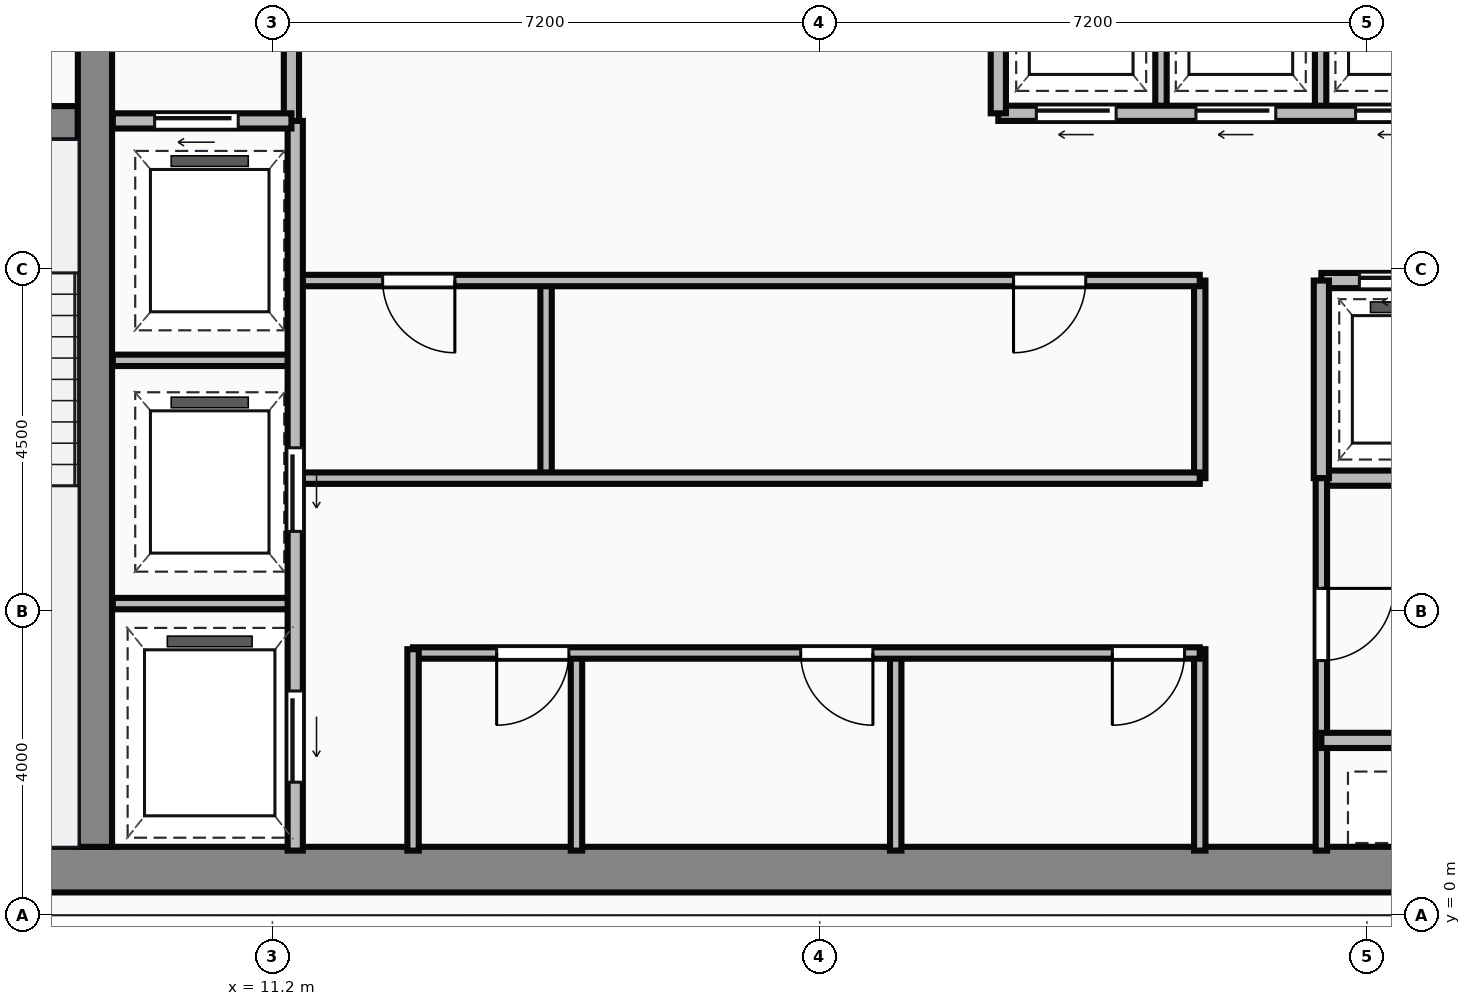
"""IFC4 building model, lengths in metres.
Left out: names, types, materials, properties, quantities, classifications, styles, units other than length and angle.
Written with IfcOpenShell. Run it as: python <this file> out.ifc"""

import sys

from ifc_helpers import new_model, si_unit, direction, frame, frame_2d, origin, place, context, subcontext, project, spatial, rectangle, extrude, source, transform, mapped, element, fill, save


model = new_model("IFC4")
c1 = context("Model", 3, precision=1e-05, world=origin(), true_north=direction((0.0, 1.0)))
c2 = subcontext(c1, "Body", "Model", "MODEL_VIEW")
j1 = project(units=[si_unit("LENGTHUNIT", "METRE"), si_unit("PLANEANGLEUNIT", "RADIAN")], contexts=[c1])
p1 = place(None, origin())
s1 = spatial("IfcSite", under=j1, at=p1, CompositionType="ELEMENT")
p2 = place(p1, origin())
s2 = spatial("IfcBuilding", under=s1, at=p2, CompositionType="ELEMENT")
p3 = place(p2, frame((0.0, 0.0, 221.45)))
s3 = spatial("IfcBuildingStorey", under=s2, at=p3, CompositionType="ELEMENT", Elevation=221.45)
m1 = source(origin(), c2, "Body", "SweptSolid", [
    extrude(rectangle(XDim=29.5, YDim=0.6, at=frame_2d((14.75, 0.0))), origin(), (0.0, 0.0, 1.0), 3.65),
])
p4 = place(p3, frame((4.5, 0.6, 0.0), z_axis=(0.0, 0.0, 1.0), x_axis=(1.0, 0.0, 0.0)))
e1 = element("IfcWall", 1, at=p4, inside=s3, PredefinedType="SHEAR", context=c2, shape_type="MappedRepresentation", body=[
    mapped(m1, transform((0.0, 0.0, 0.0))),
])
m2 = source(origin(), c2, "Body", "SweptSolid", [
    extrude(rectangle(XDim=12.5, YDim=0.45, at=frame_2d((6.25, 0.0))), origin(), (0.0, 0.0, 1.0), 3.65),
])
p5 = place(p3, frame((8.865, 0.9, 0.0), z_axis=(0.0, 0.0, 1.0), x_axis=(0.0, 1.0, 0.0)))
e2 = element("IfcWall", 2, at=p5, inside=s3, PredefinedType="SHEAR", context=c2, shape_type="MappedRepresentation", body=[
    mapped(m2, transform((0.0, 0.0, 0.0))),
])
m3 = source(origin(), c2, "Body", "SweptSolid", [
    extrude(rectangle(XDim=3.39, YDim=0.45, at=frame_2d((1.695, 0.0))), origin(), (0.0, 0.0, 1.0), 3.65),
])
p6 = place(p3, frame((5.25, 10.42, 0.0), z_axis=(0.0, 0.0, 1.0), x_axis=(1.0, 0.0, 0.0)))
e3 = element("IfcWall", 3, at=p6, inside=s3, PredefinedType="SHEAR", context=c2, shape_type="MappedRepresentation", body=[
    mapped(m3, transform((0.0, 0.0, 0.0))),
])
p7 = place(p6, frame((1.05, 0.0, 0.0)))
e4 = element("IfcOpeningElement", 4, at=p7, cuts=e3, PredefinedType="OPENING", context=c2, shape_type="SweptSolid", body=[
    extrude(rectangle(XDim=1.1, YDim=2.15, at=frame_2d((0.55, 1.075))), frame((0.0, 0.235, 0.0), z_axis=(0.0, -1.0, 0.0), x_axis=(1.0, 0.0, 0.0)), (0.0, 0.0, 1.0), 0.47),
])
m4 = source(origin(), c2, "Body", "SweptSolid", [
    extrude(rectangle(XDim=3.18, YDim=0.2, at=frame_2d((1.59, 0.0))), origin(), (0.0, 0.0, 1.0), 3.4),
])
p8 = place(p3, frame((11.45, 10.42, 0.0), z_axis=(0.0, 0.0, 1.0), x_axis=(0.0, 1.0, 0.0)))
e5 = element("IfcWall", 5, at=p8, inside=s3, PredefinedType="PARTITIONING", context=c2, shape_type="MappedRepresentation", body=[
    mapped(m4, transform((0.0, 0.0, 0.0))),
])
m5 = source(origin(), c2, "Body", "SweptSolid", [
    extrude(rectangle(XDim=2.35, YDim=0.2, at=frame_2d((1.175, 0.0))), origin(), (0.0, 0.0, 1.0), 3.4),
])
p9 = place(p3, frame((9.1, 10.45, 0.0), z_axis=(0.0, 0.0, 1.0), x_axis=(1.0, 0.0, 0.0)))
e6 = element("IfcWall", 6, at=p9, inside=s3, PredefinedType="PARTITIONING", context=c2, shape_type="MappedRepresentation", body=[
    mapped(m5, transform((0.0, 0.0, 0.0))),
])
p10 = place(p9, frame((0.55, 0.0, 0.0)))
e7 = element("IfcOpeningElement", 7, at=p10, cuts=e6, PredefinedType="OPENING", context=c2, shape_type="SweptSolid", body=[
    extrude(rectangle(XDim=1.1, YDim=2.15, at=frame_2d((0.55, 1.075))), frame((0.0, 0.11, 0.0), z_axis=(0.0, -1.0, 0.0), x_axis=(1.0, 0.0, 0.0)), (0.0, 0.0, 1.0), 0.22),
])
m6 = source(origin(), c2, "Body", "SweptSolid", [
    extrude(rectangle(XDim=9.6, YDim=0.2, at=frame_2d((4.8, 0.0))), origin(), (0.0, 0.0, 1.0), 3.4),
])
p11 = place(p3, frame((11.5, 0.85, 0.0), z_axis=(0.0, 0.0, 1.0), x_axis=(0.0, 1.0, 0.0)))
e8 = element("IfcWall", 8, at=p11, inside=s3, PredefinedType="PARTITIONING", context=c2, shape_type="MappedRepresentation", body=[
    mapped(m6, transform((0.0, 0.0, 0.0))),
])
p12 = place(p11, frame((4.2, 0.0, 0.0)))
e9 = element("IfcOpeningElement", 9, at=p12, cuts=e8, PredefinedType="OPENING", context=c2, shape_type="SweptSolid", body=[
    extrude(rectangle(XDim=1.1, YDim=2.15, at=frame_2d((0.55, 1.075))), frame((0.0, 0.11, 0.0), z_axis=(0.0, -1.0, 0.0), x_axis=(1.0, 0.0, 0.0)), (0.0, 0.0, 1.0), 0.22),
])
p13 = place(p11, frame((0.9, 0.0, 0.0)))
e10 = element("IfcOpeningElement", 10, at=p13, cuts=e8, PredefinedType="OPENING", context=c2, shape_type="SweptSolid", body=[
    extrude(rectangle(XDim=1.2, YDim=2.15, at=frame_2d((0.6, 1.075))), frame((0.0, 0.11, 0.0), z_axis=(0.0, -1.0, 0.0), x_axis=(1.0, 0.0, 0.0)), (0.0, 0.0, 1.0), 0.22),
])
m7 = source(origin(), c2, "Body", "SweptSolid", [
    extrude(rectangle(XDim=2.4, YDim=0.15, at=frame_2d((1.2, 0.0))), origin(), (0.0, 0.0, 1.0), 3.4),
])
for number, where, z_axis, x_axis in (
    (11, (9.1, 4.1, 0.0), (0.0, 0.0, 1.0), (1.0, 0.0, 0.0)),
    (12, (9.1, 7.3, 0.0), (0.0, 0.0, 1.0), (1.0, 0.0, 0.0)),
):
    element("IfcWall", number, at=place(p3, frame(where, z_axis=z_axis, x_axis=x_axis)), inside=s3, PredefinedType="PARTITIONING", context=c2, shape_type="MappedRepresentation", body=[
        mapped(m7, transform((0.0, 0.0, 0.0))),
    ])
m8 = source(origin(), c2, "Body", "SweptSolid", [
    extrude(rectangle(XDim=2.65, YDim=0.15, at=frame_2d((1.325, 0.0))), origin(), (0.0, 0.0, 1.0), 3.4),
])
p14 = place(p3, frame((13.05, 0.85, 0.0), z_axis=(0.0, 0.0, 1.0), x_axis=(0.0, 1.0, 0.0)))
e13 = element("IfcWall", 13, at=p14, inside=s3, PredefinedType="PARTITIONING", context=c2, shape_type="MappedRepresentation", body=[
    mapped(m8, transform((0.0, 0.0, 0.0))),
])
m9 = source(origin(), c2, "Body", "SweptSolid", [
    extrude(rectangle(XDim=10.35, YDim=0.15, at=frame_2d((5.175, 0.0))), origin(), (0.0, 0.0, 1.0), 3.4),
])
p15 = place(p3, frame((13.05, 3.45, 0.0), z_axis=(0.0, 0.0, 1.0), x_axis=(1.0, 0.0, 0.0)))
e14 = element("IfcWall", 14, at=p15, inside=s3, PredefinedType="PARTITIONING", context=c2, shape_type="MappedRepresentation", body=[
    mapped(m9, transform((0.0, 0.0, 0.0))),
])
p16 = place(p15, frame((1.1, 0.0, 0.0)))
e15 = element("IfcOpeningElement", 15, at=p16, cuts=e14, PredefinedType="OPENING", context=c2, shape_type="SweptSolid", body=[
    extrude(rectangle(XDim=0.95, YDim=2.15, at=frame_2d((0.475, 1.075))), frame((0.0, 0.085, 0.0), z_axis=(0.0, -1.0, 0.0), x_axis=(1.0, 0.0, 0.0)), (0.0, 0.0, 1.0), 0.17),
])
p17 = place(p15, frame((5.1, 0.0, 0.0)))
e16 = element("IfcOpeningElement", 16, at=p17, cuts=e14, PredefinedType="OPENING", context=c2, shape_type="SweptSolid", body=[
    extrude(rectangle(XDim=0.95, YDim=2.15, at=frame_2d((0.475, 1.075))), frame((0.0, 0.085, 0.0), z_axis=(0.0, -1.0, 0.0), x_axis=(1.0, 0.0, 0.0)), (0.0, 0.0, 1.0), 0.17),
])
p18 = place(p15, frame((9.2, 0.0, 0.0)))
e17 = element("IfcOpeningElement", 17, at=p18, cuts=e14, PredefinedType="OPENING", context=c2, shape_type="SweptSolid", body=[
    extrude(rectangle(XDim=0.95, YDim=2.15, at=frame_2d((0.475, 1.075))), frame((0.0, 0.085, 0.0), z_axis=(0.0, -1.0, 0.0), x_axis=(1.0, 0.0, 0.0)), (0.0, 0.0, 1.0), 0.17),
])
p19 = place(p3, frame((23.4, 0.85, 0.0), z_axis=(0.0, 0.0, 1.0), x_axis=(0.0, 1.0, 0.0)))
e18 = element("IfcWall", 18, at=p19, inside=s3, PredefinedType="PARTITIONING", context=c2, shape_type="MappedRepresentation", body=[
    mapped(m8, transform((0.0, 0.0, 0.0))),
])
m10 = source(origin(), c2, "Body", "SweptSolid", [
    extrude(rectangle(XDim=2.6, YDim=0.15, at=frame_2d((1.3, 0.0))), origin(), (0.0, 0.0, 1.0), 3.4),
])
for number, where, z_axis, x_axis in (
    (19, (15.2, 0.85, 0.0), (0.0, 0.0, 1.0), (0.0, 1.0, 0.0)),
    (20, (19.4, 0.85, 0.0), (0.0, 0.0, 1.0), (0.0, 1.0, 0.0)),
):
    element("IfcWall", number, at=place(p3, frame(where, z_axis=z_axis, x_axis=x_axis)), inside=s3, PredefinedType="PARTITIONING", context=c2, shape_type="MappedRepresentation", body=[
        mapped(m10, transform((0.0, 0.0, 0.0))),
    ])
m11 = source(origin(), c2, "Body", "SweptSolid", [
    extrude(rectangle(XDim=11.85, YDim=0.15, at=frame_2d((5.925, 0.0))), origin(), (0.0, 0.0, 1.0), 3.4),
])
p20 = place(p3, frame((11.55, 5.75, 0.0), z_axis=(0.0, 0.0, 1.0), x_axis=(1.0, 0.0, 0.0)))
e21 = element("IfcWall", 21, at=p20, inside=s3, PredefinedType="PARTITIONING", context=c2, shape_type="MappedRepresentation", body=[
    mapped(m11, transform((0.0, 0.0, 0.0))),
])
p21 = place(p3, frame((11.55, 8.35, 0.0), z_axis=(0.0, 0.0, 1.0), x_axis=(1.0, 0.0, 0.0)))
e22 = element("IfcWall", 22, at=p21, inside=s3, PredefinedType="PARTITIONING", context=c2, shape_type="MappedRepresentation", body=[
    mapped(m11, transform((0.0, 0.0, 0.0))),
])
p22 = place(p21, frame((1.1, 0.0, 0.0)))
e23 = element("IfcOpeningElement", 23, at=p22, cuts=e22, PredefinedType="OPENING", context=c2, shape_type="SweptSolid", body=[
    extrude(rectangle(XDim=0.95, YDim=2.15, at=frame_2d((0.475, 1.075))), frame((0.0, 0.085, 0.0), z_axis=(0.0, -1.0, 0.0), x_axis=(1.0, 0.0, 0.0)), (0.0, 0.0, 1.0), 0.17),
])
p23 = place(p21, frame((9.4, 0.0, 0.0)))
e24 = element("IfcOpeningElement", 24, at=p23, cuts=e22, PredefinedType="OPENING", context=c2, shape_type="SweptSolid", body=[
    extrude(rectangle(XDim=0.95, YDim=2.15, at=frame_2d((0.475, 1.075))), frame((0.0, 0.085, 0.0), z_axis=(0.0, -1.0, 0.0), x_axis=(1.0, 0.0, 0.0)), (0.0, 0.0, 1.0), 0.17),
])
m12 = source(origin(), c2, "Body", "SweptSolid", [
    extrude(rectangle(XDim=2.6, YDim=0.15, at=frame_2d((1.3, 0.0))), origin(), (0.0, 0.0, 1.0), 3.4),
])
p24 = place(p3, frame((23.4, 5.75, 0.0), z_axis=(0.0, 0.0, 1.0), x_axis=(0.0, 1.0, 0.0)))
e25 = element("IfcWall", 25, at=p24, inside=s3, PredefinedType="PARTITIONING", context=c2, shape_type="MappedRepresentation", body=[
    mapped(m12, transform((0.0, 0.0, 0.0))),
])
m13 = source(origin(), c2, "Body", "SweptSolid", [
    extrude(rectangle(XDim=2.5, YDim=0.15, at=frame_2d((1.25, 0.0))), origin(), (0.0, 0.0, 1.0), 3.4),
])
p25 = place(p3, frame((14.8, 5.8, 0.0), z_axis=(0.0, 0.0, 1.0), x_axis=(0.0, 1.0, 0.0)))
e26 = element("IfcWall", 26, at=p25, inside=s3, PredefinedType="PARTITIONING", context=c2, shape_type="MappedRepresentation", body=[
    mapped(m13, transform((0.0, 0.0, 0.0))),
])
m14 = source(origin(), c2, "Body", "SweptSolid", [
    extrude(rectangle(XDim=8.8, YDim=0.2, at=frame_2d((4.4, 0.0))), origin(), (0.0, 0.0, 1.0), 3.4),
])
p26 = place(p3, frame((20.75, 10.55, 0.0), z_axis=(0.0, 0.0, 1.0), x_axis=(1.0, 0.0, 0.0)))
e27 = element("IfcWall", 27, at=p26, inside=s3, PredefinedType="PARTITIONING", context=c2, shape_type="MappedRepresentation", body=[
    mapped(m14, transform((0.0, 0.0, 0.0))),
])
p27 = place(p26, frame((0.5, 0.0, 0.0)))
e28 = element("IfcOpeningElement", 28, at=p27, cuts=e27, PredefinedType="OPENING", context=c2, shape_type="SweptSolid", body=[
    extrude(rectangle(XDim=1.05, YDim=2.15, at=frame_2d((0.525, 1.075))), frame((0.0, 0.11, 0.0), z_axis=(0.0, -1.0, 0.0), x_axis=(1.0, 0.0, 0.0)), (0.0, 0.0, 1.0), 0.22),
])
p28 = place(p26, frame((2.6, 0.0, 0.0)))
e29 = element("IfcOpeningElement", 29, at=p28, cuts=e27, PredefinedType="OPENING", context=c2, shape_type="SweptSolid", body=[
    extrude(rectangle(XDim=1.05, YDim=2.15, at=frame_2d((0.525, 1.075))), frame((0.0, 0.11, 0.0), z_axis=(0.0, -1.0, 0.0), x_axis=(1.0, 0.0, 0.0)), (0.0, 0.0, 1.0), 0.22),
])
p29 = place(p26, frame((4.7, 0.0, 0.0)))
e30 = element("IfcOpeningElement", 30, at=p29, cuts=e27, PredefinedType="OPENING", context=c2, shape_type="SweptSolid", body=[
    extrude(rectangle(XDim=1.05, YDim=2.15, at=frame_2d((0.525, 1.075))), frame((0.0, 0.11, 0.0), z_axis=(0.0, -1.0, 0.0), x_axis=(1.0, 0.0, 0.0)), (0.0, 0.0, 1.0), 0.22),
])
p30 = place(p26, frame((6.8, 0.0, 0.0)))
e31 = element("IfcOpeningElement", 31, at=p30, cuts=e27, PredefinedType="OPENING", context=c2, shape_type="SweptSolid", body=[
    extrude(rectangle(XDim=1.05, YDim=2.15, at=frame_2d((0.525, 1.075))), frame((0.0, 0.11, 0.0), z_axis=(0.0, -1.0, 0.0), x_axis=(1.0, 0.0, 0.0)), (0.0, 0.0, 1.0), 0.22),
])
m15 = source(origin(), c2, "Body", "SweptSolid", [
    extrude(rectangle(XDim=3.0, YDim=0.2, at=frame_2d((1.5, 0.0))), origin(), (0.0, 0.0, 1.0), 3.4),
])
p31 = place(p3, frame((20.75, 10.55, 0.0), z_axis=(0.0, 0.0, 1.0), x_axis=(0.0, 1.0, 0.0)))
e32 = element("IfcWall", 32, at=p31, inside=s3, PredefinedType="PARTITIONING", context=c2, shape_type="MappedRepresentation", body=[
    mapped(m15, transform((0.0, 0.0, 0.0))),
])
m16 = source(origin(), c2, "Body", "SweptSolid", [
    extrude(rectangle(XDim=2.85, YDim=0.15, at=frame_2d((1.425, 0.0))), origin(), (0.0, 0.0, 1.0), 3.4),
])
for number, where, z_axis, x_axis in (
    (33, (22.89, 10.6, 0.0), (0.0, 0.0, 1.0), (0.0, 1.0, 0.0)),
    (34, (24.99, 10.6, 0.0), (0.0, 0.0, 1.0), (0.0, 1.0, 0.0)),
):
    element("IfcWall", number, at=place(p3, frame(where, z_axis=z_axis, x_axis=x_axis)), inside=s3, PredefinedType="PARTITIONING", context=c2, shape_type="MappedRepresentation", body=[
        mapped(m16, transform((0.0, 0.0, 0.0))),
    ])
m17 = source(origin(), c2, "Body", "SweptSolid", [
    extrude(rectangle(XDim=4.55, YDim=0.2, at=frame_2d((2.275, 0.0))), origin(), (0.0, 0.0, 1.0), 3.4),
])
p32 = place(p3, frame((25.0, 8.35, 0.0), z_axis=(0.0, 0.0, 1.0), x_axis=(1.0, 0.0, 0.0)))
e35 = element("IfcWall", 35, at=p32, inside=s3, PredefinedType="PARTITIONING", context=c2, shape_type="MappedRepresentation", body=[
    mapped(m17, transform((0.0, 0.0, 0.0))),
])
p33 = place(p32, frame((0.5, 0.0, 0.0)))
e36 = element("IfcOpeningElement", 36, at=p33, cuts=e35, PredefinedType="OPENING", context=c2, shape_type="SweptSolid", body=[
    extrude(rectangle(XDim=1.05, YDim=2.15, at=frame_2d((0.525, 1.075))), frame((0.0, 0.11, 0.0), z_axis=(0.0, -1.0, 0.0), x_axis=(1.0, 0.0, 0.0)), (0.0, 0.0, 1.0), 0.22),
])
p34 = place(p32, frame((2.6, 0.0, 0.0)))
e37 = element("IfcOpeningElement", 37, at=p34, cuts=e35, PredefinedType="OPENING", context=c2, shape_type="SweptSolid", body=[
    extrude(rectangle(XDim=1.05, YDim=2.15, at=frame_2d((0.525, 1.075))), frame((0.0, 0.11, 0.0), z_axis=(0.0, -1.0, 0.0), x_axis=(1.0, 0.0, 0.0)), (0.0, 0.0, 1.0), 0.22),
])
p35 = place(p3, frame((25.0, 5.75, 0.0), z_axis=(0.0, 0.0, 1.0), x_axis=(1.0, 0.0, 0.0)))
e38 = element("IfcWall", 38, at=p35, inside=s3, PredefinedType="PARTITIONING", context=c2, shape_type="MappedRepresentation", body=[
    mapped(m17, transform((0.0, 0.0, 0.0))),
])
m18 = source(origin(), c2, "Body", "SweptSolid", [
    extrude(rectangle(XDim=2.6, YDim=0.2, at=frame_2d((1.3, 0.0))), origin(), (0.0, 0.0, 1.0), 3.4),
])
p36 = place(p3, frame((25.0, 5.75, 0.0), z_axis=(0.0, 0.0, 1.0), x_axis=(0.0, 1.0, 0.0)))
e39 = element("IfcWall", 39, at=p36, inside=s3, PredefinedType="PARTITIONING", context=c2, shape_type="MappedRepresentation", body=[
    mapped(m18, transform((0.0, 0.0, 0.0))),
])
m19 = source(origin(), c2, "Body", "SweptSolid", [
    extrude(rectangle(XDim=4.9, YDim=0.15, at=frame_2d((2.45, 0.0))), origin(), (0.0, 0.0, 1.0), 3.4),
])
p37 = place(p3, frame((25.0, 0.85, 0.0), z_axis=(0.0, 0.0, 1.0), x_axis=(0.0, 1.0, 0.0)))
e40 = element("IfcWall", 40, at=p37, inside=s3, PredefinedType="PARTITIONING", context=c2, shape_type="MappedRepresentation", body=[
    mapped(m19, transform((0.0, 0.0, 0.0))),
])
p38 = place(p37, frame((2.5, 0.0, 0.0)))
e41 = element("IfcOpeningElement", 41, at=p38, cuts=e40, PredefinedType="OPENING", context=c2, shape_type="SweptSolid", body=[
    extrude(rectangle(XDim=0.95, YDim=2.15, at=frame_2d((0.475, 1.075))), frame((0.0, 0.085, 0.0), z_axis=(0.0, -1.0, 0.0), x_axis=(1.0, 0.0, 0.0)), (0.0, 0.0, 1.0), 0.17),
])
m20 = source(origin(), c2, "Body", "SweptSolid", [
    extrude(rectangle(XDim=2.4, YDim=0.2, at=frame_2d((1.2, 0.0))), origin(), (0.0, 0.0, 1.0), 3.4),
])
p39 = place(p3, frame((25.0, 2.3, 0.0), z_axis=(0.0, 0.0, 1.0), x_axis=(1.0, 0.0, 0.0)))
e42 = element("IfcWall", 42, at=p39, inside=s3, PredefinedType="PARTITIONING", context=c2, shape_type="MappedRepresentation", body=[
    mapped(m20, transform((0.0, 0.0, 0.0))),
])
m21 = source(origin(), c2, "Body", "SweptSolid", [
    extrude(rectangle(XDim=1.1, YDim=2.15, at=frame_2d((0.55, 1.075))), frame((0.0, 0.025, 0.0), z_axis=(0.0, -1.0, 0.0), x_axis=(1.0, 0.0, 0.0)), (0.0, 0.0, 1.0), 0.05),
])
p40 = place(p10, origin())
e43 = element("IfcDoor", 43, at=p40, inside=s3, OperationType="SLIDING_TO_LEFT", PredefinedType="DOOR", context=c2, shape_type="MappedRepresentation", body=[
    mapped(m21, transform((0.0, 0.0, 0.0))),
])
fill(e7, e43)
p41 = place(p12, frame((1.1, 0.0, 0.0), z_axis=(0.0, 0.0, 1.0), x_axis=(-1.0, 0.0, 0.0)))
e44 = element("IfcDoor", 44, at=p41, inside=s3, OperationType="SLIDING_TO_LEFT", PredefinedType="DOOR", context=c2, shape_type="MappedRepresentation", body=[
    mapped(m21, transform((0.0, 0.0, 0.0))),
])
fill(e9, e44)
m22 = source(origin(), c2, "Body", "SweptSolid", [
    extrude(rectangle(XDim=1.2, YDim=2.15, at=frame_2d((0.6, 1.075))), frame((0.0, 0.025, 0.0), z_axis=(0.0, -1.0, 0.0), x_axis=(1.0, 0.0, 0.0)), (0.0, 0.0, 1.0), 0.05),
])
p42 = place(p13, frame((1.2, 0.0, 0.0), z_axis=(0.0, 0.0, 1.0), x_axis=(-1.0, 0.0, 0.0)))
e45 = element("IfcDoor", 45, at=p42, inside=s3, OperationType="SLIDING_TO_LEFT", PredefinedType="DOOR", context=c2, shape_type="MappedRepresentation", body=[
    mapped(m22, transform((0.0, 0.0, 0.0))),
])
fill(e10, e45)
m23 = source(origin(), c2, "Body", "SweptSolid", [
    extrude(rectangle(XDim=0.95, YDim=2.15, at=frame_2d((0.475, 1.075))), frame((0.0, 0.025, 0.0), z_axis=(0.0, -1.0, 0.0), x_axis=(1.0, 0.0, 0.0)), (0.0, 0.0, 1.0), 0.05),
])
p43 = place(p16, origin())
e46 = element("IfcDoor", 46, at=p43, inside=s3, OperationType="SINGLE_SWING_LEFT", PredefinedType="DOOR", context=c2, shape_type="MappedRepresentation", body=[
    mapped(m23, transform((0.0, 0.0, 0.0))),
])
fill(e15, e46)
p44 = place(p17, origin())
e47 = element("IfcDoor", 47, at=p44, inside=s3, OperationType="SINGLE_SWING_RIGHT", PredefinedType="DOOR", context=c2, shape_type="MappedRepresentation", body=[
    mapped(m23, transform((0.0, 0.0, 0.0))),
])
fill(e16, e47)
p45 = place(p18, origin())
e48 = element("IfcDoor", 48, at=p45, inside=s3, OperationType="SINGLE_SWING_LEFT", PredefinedType="DOOR", context=c2, shape_type="MappedRepresentation", body=[
    mapped(m23, transform((0.0, 0.0, 0.0))),
])
fill(e17, e48)
p46 = place(p22, origin())
e49 = element("IfcDoor", 49, at=p46, inside=s3, OperationType="SINGLE_SWING_RIGHT", PredefinedType="DOOR", context=c2, shape_type="MappedRepresentation", body=[
    mapped(m23, transform((0.0, 0.0, 0.0))),
])
fill(e23, e49)
p47 = place(p23, origin())
e50 = element("IfcDoor", 50, at=p47, inside=s3, OperationType="SINGLE_SWING_LEFT", PredefinedType="DOOR", context=c2, shape_type="MappedRepresentation", body=[
    mapped(m23, transform((0.0, 0.0, 0.0))),
])
fill(e24, e50)
m24 = source(origin(), c2, "Body", "SweptSolid", [
    extrude(rectangle(XDim=1.05, YDim=2.15, at=frame_2d((0.525, 1.075))), frame((0.0, 0.025, 0.0), z_axis=(0.0, -1.0, 0.0), x_axis=(1.0, 0.0, 0.0)), (0.0, 0.0, 1.0), 0.05),
])
p48 = place(p27, frame((1.05, 0.0, 0.0), z_axis=(0.0, 0.0, 1.0), x_axis=(-1.0, 0.0, 0.0)))
e51 = element("IfcDoor", 51, at=p48, inside=s3, OperationType="SLIDING_TO_LEFT", PredefinedType="DOOR", context=c2, shape_type="MappedRepresentation", body=[
    mapped(m24, transform((0.0, 0.0, 0.0))),
])
fill(e28, e51)
p49 = place(p28, frame((1.05, 0.0, 0.0), z_axis=(0.0, 0.0, 1.0), x_axis=(-1.0, 0.0, 0.0)))
e52 = element("IfcDoor", 52, at=p49, inside=s3, OperationType="SLIDING_TO_LEFT", PredefinedType="DOOR", context=c2, shape_type="MappedRepresentation", body=[
    mapped(m24, transform((0.0, 0.0, 0.0))),
])
fill(e29, e52)
p50 = place(p29, frame((1.05, 0.0, 0.0), z_axis=(0.0, 0.0, 1.0), x_axis=(-1.0, 0.0, 0.0)))
e53 = element("IfcDoor", 53, at=p50, inside=s3, OperationType="SLIDING_TO_LEFT", PredefinedType="DOOR", context=c2, shape_type="MappedRepresentation", body=[
    mapped(m24, transform((0.0, 0.0, 0.0))),
])
fill(e30, e53)
p51 = place(p33, origin())
e54 = element("IfcDoor", 54, at=p51, inside=s3, OperationType="SLIDING_TO_LEFT", PredefinedType="DOOR", context=c2, shape_type="MappedRepresentation", body=[
    mapped(m24, transform((0.0, 0.0, 0.0))),
])
fill(e36, e54)
p52 = place(p38, origin())
e55 = element("IfcDoor", 55, at=p52, inside=s3, OperationType="SINGLE_SWING_RIGHT", PredefinedType="DOOR", context=c2, shape_type="MappedRepresentation", body=[
    mapped(m23, transform((0.0, 0.0, 0.0))),
])
fill(e41, e55)
save(model, sys.argv[1])
